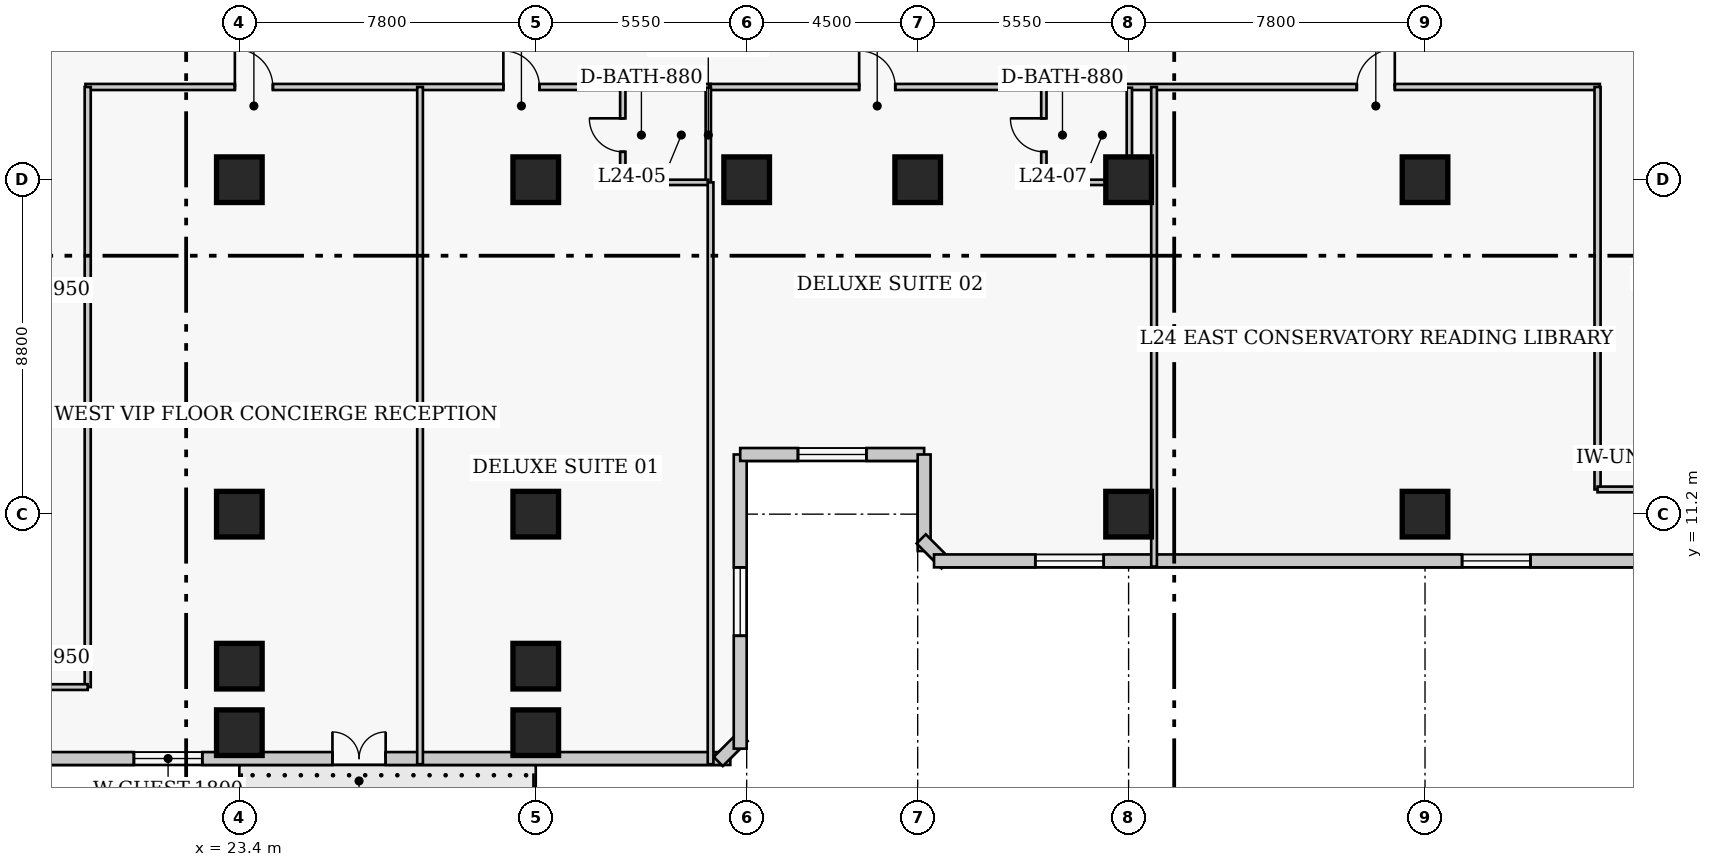
"""IFC4 building model, lengths in metres.
Left out: names, types, materials, properties, quantities, classifications, styles, units other than length and angle.
Written with IfcOpenShell. Run it as: python <this file> out.ifc"""

import sys

from ifc_helpers import new_model, si_unit, direction, frame, frame_2d, origin, origin_2d, place, context, subcontext, project, spatial, rectangle, extrude, element, fill, save


model = new_model("IFC4")
c1 = context("Model", 3, precision=1e-05, world=origin(), true_north=direction((0.0, 1.0)))
c2 = subcontext(c1, "Body", "Model", "MODEL_VIEW")
j1 = project(units=[si_unit("LENGTHUNIT", "METRE"), si_unit("PLANEANGLEUNIT", "RADIAN")], contexts=[c1])
p1 = place(None, origin())
s1 = spatial("IfcSite", under=j1, at=p1, CompositionType="ELEMENT")
p2 = place(p1, origin())
s2 = spatial("IfcBuilding", under=s1, at=p2, CompositionType="ELEMENT")
p3 = place(p2, frame((0.0, 0.0, 99.4)))
s3 = spatial("IfcBuildingStorey", under=s2, at=p3, CompositionType="ELEMENT", Elevation=99.4)
for number, where, z_axis, x_axis in (
    (1, (23.4, 11.2, 0.0), (0.0, 0.0, 1.0), (1.0, 0.0, 0.0)),
    (2, (23.4, 20.0, 0.0), (0.0, 0.0, 1.0), (1.0, 0.0, 0.0)),
    (3, (31.2, 11.2, 0.0), (0.0, 0.0, 1.0), (1.0, 0.0, 0.0)),
    (4, (31.2, 20.0, 0.0), (0.0, 0.0, 1.0), (1.0, 0.0, 0.0)),
    (5, (36.75, 20.0, 0.0), (0.0, 0.0, 1.0), (1.0, 0.0, 0.0)),
    (6, (41.25, 20.0, 0.0), (0.0, 0.0, 1.0), (1.0, 0.0, 0.0)),
    (7, (46.8, 11.2, 0.0), (0.0, 0.0, 1.0), (1.0, 0.0, 0.0)),
    (8, (46.8, 20.0, 0.0), (0.0, 0.0, 1.0), (1.0, 0.0, 0.0)),
    (9, (54.6, 11.2, 0.0), (0.0, 0.0, 1.0), (1.0, 0.0, 0.0)),
    (10, (54.6, 20.0, 0.0), (0.0, 0.0, 1.0), (1.0, 0.0, 0.0)),
    (11, (23.4, 7.2, 0.0), (0.0, 0.0, 1.0), (1.0, 0.0, 0.0)),
    (12, (31.2, 7.2, 0.0), (0.0, 0.0, 1.0), (1.0, 0.0, 0.0)),
    (13, (23.4, 5.45, 0.0), (0.0, 0.0, 1.0), (1.0, 0.0, 0.0)),
    (14, (31.2, 5.45, 0.0), (0.0, 0.0, 1.0), (1.0, 0.0, 0.0)),
):
    element("IfcColumn", number, at=place(p3, frame(where, z_axis=z_axis, x_axis=x_axis)), inside=s3, PredefinedType="COLUMN", context=c2, shape_type="SweptSolid", body=[
        extrude(rectangle(XDim=1.2, YDim=1.2, at=origin_2d()), origin(), (0.0, 0.0, 1.0), 3.8),
    ])
p4 = place(p3, frame((8.03, 4.77, 0.0), z_axis=(0.0, 0.0, 1.0), x_axis=(1.0, 0.0, 0.0)))
e15 = element("IfcWall", 15, at=p4, inside=s3, PredefinedType="SOLIDWALL", context=c2, shape_type="SweptSolid", body=[
    extrude(rectangle(XDim=28.29, YDim=0.34, at=frame_2d((14.145, 0.0))), origin(), (0.0, 0.0, 1.0), 3.54),
])
p5 = place(p4, frame((17.82, 0.0, 0.0)))
e16 = element("IfcOpeningElement", 16, at=p5, cuts=e15, PredefinedType="OPENING", context=c2, shape_type="SweptSolid", body=[
    extrude(rectangle(XDim=1.4, YDim=2.15, at=frame_2d((0.7, 1.075))), frame((0.0, 0.18, 0.0), z_axis=(0.0, -1.0, 0.0), x_axis=(1.0, 0.0, 0.0)), (0.0, 0.0, 1.0), 0.36),
])
p6 = place(p4, frame((12.595, 0.0, 0.85)))
e17 = element("IfcOpeningElement", 17, at=p6, cuts=e15, PredefinedType="OPENING", context=c2, shape_type="SweptSolid", body=[
    extrude(rectangle(XDim=1.8, YDim=1.8, at=frame_2d((0.9, 0.9))), frame((0.0, 0.18, 0.0), z_axis=(0.0, -1.0, 0.0), x_axis=(1.0, 0.0, 0.0)), (0.0, 0.0, 1.0), 0.36),
])
p7 = place(p3, frame((36.001, 4.692, 0.0), z_axis=(0.0, 0.0, 1.0), x_axis=(0.707238225886, 0.706975312048, 0.0)))
e18 = element("IfcWall", 18, at=p7, inside=s3, PredefinedType="SOLIDWALL", context=c2, shape_type="SweptSolid", body=[
    extrude(rectangle(XDim=0.929, YDim=0.34, at=frame_2d((0.464, 0.0))), origin(), (0.0, 0.0, 1.0), 3.54),
])
p8 = place(p3, frame((36.58, 5.03, 0.0), z_axis=(0.0, 0.0, 1.0), x_axis=(0.0, 1.0, 0.0)))
e19 = element("IfcWall", 19, at=p8, inside=s3, PredefinedType="SOLIDWALL", context=c2, shape_type="SweptSolid", body=[
    extrude(rectangle(XDim=7.74, YDim=0.34, at=frame_2d((3.87, 0.0))), origin(), (0.0, 0.0, 1.0), 3.54),
])
p9 = place(p8, frame((2.97, 0.0, 0.85)))
e20 = element("IfcOpeningElement", 20, at=p9, cuts=e19, PredefinedType="OPENING", context=c2, shape_type="SweptSolid", body=[
    extrude(rectangle(XDim=1.8, YDim=1.8, at=frame_2d((0.9, 0.9))), frame((0.0, 0.18, 0.0), z_axis=(0.0, -1.0, 0.0), x_axis=(1.0, 0.0, 0.0)), (0.0, 0.0, 1.0), 0.36),
])
p10 = place(p3, frame((36.58, 12.77, 0.0), z_axis=(0.0, 0.0, 1.0), x_axis=(1.0, 0.0, 0.0)))
e21 = element("IfcWall", 21, at=p10, inside=s3, PredefinedType="SOLIDWALL", context=c2, shape_type="SweptSolid", body=[
    extrude(rectangle(XDim=4.84, YDim=0.34, at=frame_2d((2.42, 0.0))), origin(), (0.0, 0.0, 1.0), 3.54),
])
p11 = place(p10, frame((1.52, 0.0, 0.85)))
e22 = element("IfcOpeningElement", 22, at=p11, cuts=e21, PredefinedType="OPENING", context=c2, shape_type="SweptSolid", body=[
    extrude(rectangle(XDim=1.8, YDim=1.8, at=frame_2d((0.9, 0.9))), frame((0.0, 0.18, 0.0), z_axis=(0.0, -1.0, 0.0), x_axis=(1.0, 0.0, 0.0)), (0.0, 0.0, 1.0), 0.36),
])
p12 = place(p3, frame((41.42, 12.77, 0.0), z_axis=(0.0, 0.0, 1.0), x_axis=(0.0, -1.0, 0.0)))
e23 = element("IfcWall", 23, at=p12, inside=s3, PredefinedType="SOLIDWALL", context=c2, shape_type="SweptSolid", body=[
    extrude(rectangle(XDim=2.54, YDim=0.34, at=frame_2d((1.27, 0.0))), origin(), (0.0, 0.0, 1.0), 3.54),
])
p13 = place(p3, frame((41.342, 10.549, 0.0), z_axis=(0.0, 0.0, 1.0), x_axis=(0.707106781187, -0.707106781187, 0.0)))
e24 = element("IfcWall", 24, at=p13, inside=s3, PredefinedType="SOLIDWALL", context=c2, shape_type="SweptSolid", body=[
    extrude(rectangle(XDim=0.929, YDim=0.34, at=frame_2d((0.464, 0.0))), origin(), (0.0, 0.0, 1.0), 3.54),
])
p14 = place(p3, frame((41.68, 9.97, 0.0), z_axis=(0.0, 0.0, 1.0), x_axis=(1.0, 0.0, 0.0)))
e25 = element("IfcWall", 25, at=p14, inside=s3, PredefinedType="SOLIDWALL", context=c2, shape_type="SweptSolid", body=[
    extrude(rectangle(XDim=28.29, YDim=0.34, at=frame_2d((14.145, 0.0))), origin(), (0.0, 0.0, 1.0), 3.54),
])
p15 = place(p14, frame((2.665, 0.0, 0.85)))
e26 = element("IfcOpeningElement", 26, at=p15, cuts=e25, PredefinedType="OPENING", context=c2, shape_type="SweptSolid", body=[
    extrude(rectangle(XDim=1.8, YDim=1.8, at=frame_2d((0.9, 0.9))), frame((0.0, 0.18, 0.0), z_axis=(0.0, -1.0, 0.0), x_axis=(1.0, 0.0, 0.0)), (0.0, 0.0, 1.0), 0.36),
])
p16 = place(p14, frame((13.895, 0.0, 0.85)))
e27 = element("IfcOpeningElement", 27, at=p16, cuts=e25, PredefinedType="OPENING", context=c2, shape_type="SweptSolid", body=[
    extrude(rectangle(XDim=1.8, YDim=1.8, at=frame_2d((0.9, 0.9))), frame((0.0, 0.18, 0.0), z_axis=(0.0, -1.0, 0.0), x_axis=(1.0, 0.0, 0.0)), (0.0, 0.0, 1.0), 0.36),
])
p17 = place(p3, frame((19.35, 22.44, 0.0), z_axis=(0.0, 0.0, 1.0), x_axis=(1.0, 0.0, 0.0)))
e28 = element("IfcWall", 28, at=p17, inside=s3, PredefinedType="PARTITIONING", context=c2, shape_type="SweptSolid", body=[
    extrude(rectangle(XDim=16.45, YDim=0.16, at=frame_2d((8.225, 0.0))), origin(), (0.0, 0.0, 1.0), 3.54),
])
p18 = place(p17, frame((3.933, 0.0, 0.0)))
e29 = element("IfcOpeningElement", 29, at=p18, cuts=e28, PredefinedType="OPENING", context=c2, shape_type="SweptSolid", body=[
    extrude(rectangle(XDim=1.0, YDim=2.15, at=frame_2d((0.5, 1.075))), frame((0.0, 0.09, 0.0), z_axis=(0.0, -1.0, 0.0), x_axis=(1.0, 0.0, 0.0)), (0.0, 0.0, 1.0), 0.18),
])
p19 = place(p17, frame((10.998, 0.0, 0.0)))
e30 = element("IfcOpeningElement", 30, at=p19, cuts=e28, PredefinedType="OPENING", context=c2, shape_type="SweptSolid", body=[
    extrude(rectangle(XDim=0.95, YDim=2.1, at=frame_2d((0.475, 1.05))), frame((0.0, 0.09, 0.0), z_axis=(0.0, -1.0, 0.0), x_axis=(1.0, 0.0, 0.0)), (0.0, 0.0, 1.0), 0.18),
])
p20 = place(p3, frame((35.8, 22.44, 0.0), z_axis=(0.0, 0.0, 1.0), x_axis=(1.0, 0.0, 0.0)))
e31 = element("IfcWall", 31, at=p20, inside=s3, PredefinedType="PARTITIONING", context=c2, shape_type="SweptSolid", body=[
    extrude(rectangle(XDim=23.4, YDim=0.16, at=frame_2d((11.7, 0.0))), origin(), (0.0, 0.0, 1.0), 3.54),
])
p21 = place(p20, frame((3.91, 0.0, 0.0)))
e32 = element("IfcOpeningElement", 32, at=p21, cuts=e31, PredefinedType="OPENING", context=c2, shape_type="SweptSolid", body=[
    extrude(rectangle(XDim=0.95, YDim=2.1, at=frame_2d((0.475, 1.05))), frame((0.0, 0.09, 0.0), z_axis=(0.0, -1.0, 0.0), x_axis=(1.0, 0.0, 0.0)), (0.0, 0.0, 1.0), 0.18),
])
p22 = place(p20, frame((17.005, 0.0, 0.0)))
e33 = element("IfcOpeningElement", 33, at=p22, cuts=e31, PredefinedType="OPENING", context=c2, shape_type="SweptSolid", body=[
    extrude(rectangle(XDim=1.0, YDim=2.15, at=frame_2d((0.5, 1.075))), frame((0.0, 0.09, 0.0), z_axis=(0.0, -1.0, 0.0), x_axis=(1.0, 0.0, 0.0)), (0.0, 0.0, 1.0), 0.18),
])
p23 = place(p3, frame((19.41, 6.65, 0.0), z_axis=(0.0, 0.0, 1.0), x_axis=(0.0, 1.0, 0.0)))
e34 = element("IfcWall", 34, at=p23, inside=s3, PredefinedType="PARTITIONING", context=c2, shape_type="SweptSolid", body=[
    extrude(rectangle(XDim=15.79, YDim=0.16, at=frame_2d((7.895, 0.0))), origin(), (0.0, 0.0, 1.0), 3.083),
])
p24 = place(p3, frame((59.14, 11.85, 0.0), z_axis=(0.0, 0.0, 1.0), x_axis=(0.0, 1.0, 0.0)))
e35 = element("IfcWall", 35, at=p24, inside=s3, PredefinedType="PARTITIONING", context=c2, shape_type="SweptSolid", body=[
    extrude(rectangle(XDim=10.59, YDim=0.16, at=frame_2d((5.295, 0.0))), origin(), (0.0, 0.0, 1.0), 3.54),
])
p25 = place(p3, frame((59.14, 11.85, 0.0), z_axis=(0.0, 0.0, 1.0), x_axis=(1.0, 0.0, 0.0)))
e36 = element("IfcWall", 36, at=p25, inside=s3, PredefinedType="PARTITIONING", context=c2, shape_type="SweptSolid", body=[
    extrude(rectangle(XDim=2.22, YDim=0.15, at=frame_2d((1.11, 0.0))), origin(), (0.0, 0.0, 1.0), 3.54),
])
p26 = place(p3, frame((17.19, 6.65, 0.0), z_axis=(0.0, 0.0, 1.0), x_axis=(1.0, 0.0, 0.0)))
e37 = element("IfcWall", 37, at=p26, inside=s3, PredefinedType="PARTITIONING", context=c2, shape_type="SweptSolid", body=[
    extrude(rectangle(XDim=2.22, YDim=0.15, at=frame_2d((1.11, 0.0))), origin(), (0.0, 0.0, 1.0), 3.54),
])
p27 = place(p3, frame((28.155, 4.62, 0.0), z_axis=(0.0, 0.0, 1.0), x_axis=(0.0, 1.0, 0.0)))
e38 = element("IfcWall", 38, at=p27, inside=s3, PredefinedType="PARTITIONING", context=c2, shape_type="SweptSolid", body=[
    extrude(rectangle(XDim=17.82, YDim=0.15, at=frame_2d((8.91, 0.0))), origin(), (0.0, 0.0, 1.0), 3.54),
])
p28 = place(p3, frame((33.49, 19.93, 0.0), z_axis=(0.0, 0.0, 1.0), x_axis=(0.0, 1.0, 0.0)))
e39 = element("IfcWall", 39, at=p28, inside=s3, PredefinedType="PLUMBINGWALL", context=c2, shape_type="SweptSolid", body=[
    extrude(rectangle(XDim=2.49, YDim=0.14, at=frame_2d((1.245, 0.0))), origin(), (0.0, 0.0, 1.0), 3.54),
])
p29 = place(p28, frame((0.805, 0.0, 0.0)))
e40 = element("IfcOpeningElement", 40, at=p29, cuts=e39, PredefinedType="OPENING", context=c2, shape_type="SweptSolid", body=[
    extrude(rectangle(XDim=0.88, YDim=2.05, at=frame_2d((0.44, 1.025))), frame((0.0, 0.08, 0.0), z_axis=(0.0, -1.0, 0.0), x_axis=(1.0, 0.0, 0.0)), (0.0, 0.0, 1.0), 0.16),
])
p30 = place(p3, frame((35.74, 19.93, 0.0), z_axis=(0.0, 0.0, 1.0), x_axis=(0.0, 1.0, 0.0)))
e41 = element("IfcWall", 41, at=p30, inside=s3, PredefinedType="PLUMBINGWALL", context=c2, shape_type="SweptSolid", body=[
    extrude(rectangle(XDim=2.49, YDim=0.14, at=frame_2d((1.245, 0.0))), origin(), (0.0, 0.0, 1.0), 3.54),
])
p31 = place(p3, frame((33.49, 19.93, 0.0), z_axis=(0.0, 0.0, 1.0), x_axis=(1.0, 0.0, 0.0)))
e42 = element("IfcWall", 42, at=p31, inside=s3, PredefinedType="PLUMBINGWALL", context=c2, shape_type="SweptSolid", body=[
    extrude(rectangle(XDim=2.25, YDim=0.14, at=frame_2d((1.125, 0.0))), origin(), (0.0, 0.0, 1.0), 2.679),
])
p32 = place(p3, frame((35.8, 4.62, 0.0), z_axis=(0.0, 0.0, 1.0), x_axis=(0.0, 1.0, 0.0)))
e43 = element("IfcWall", 43, at=p32, inside=s3, PredefinedType="PARTITIONING", context=c2, shape_type="SweptSolid", body=[
    extrude(rectangle(XDim=15.31, YDim=0.15, at=frame_2d((7.655, 0.0))), origin(), (0.0, 0.0, 1.0), 3.54),
])
p33 = place(p3, frame((44.57, 19.93, 0.0), z_axis=(0.0, 0.0, 1.0), x_axis=(0.0, 1.0, 0.0)))
e44 = element("IfcWall", 44, at=p33, inside=s3, PredefinedType="PLUMBINGWALL", context=c2, shape_type="SweptSolid", body=[
    extrude(rectangle(XDim=2.49, YDim=0.14, at=frame_2d((1.245, 0.0))), origin(), (0.0, 0.0, 1.0), 3.54),
])
p34 = place(p33, frame((0.805, 0.0, 0.0)))
e45 = element("IfcOpeningElement", 45, at=p34, cuts=e44, PredefinedType="OPENING", context=c2, shape_type="SweptSolid", body=[
    extrude(rectangle(XDim=0.88, YDim=2.05, at=frame_2d((0.44, 1.025))), frame((0.0, 0.08, 0.0), z_axis=(0.0, -1.0, 0.0), x_axis=(1.0, 0.0, 0.0)), (0.0, 0.0, 1.0), 0.16),
])
p35 = place(p3, frame((46.82, 19.93, 0.0), z_axis=(0.0, 0.0, 1.0), x_axis=(0.0, 1.0, 0.0)))
e46 = element("IfcWall", 46, at=p35, inside=s3, PredefinedType="PLUMBINGWALL", context=c2, shape_type="SweptSolid", body=[
    extrude(rectangle(XDim=2.49, YDim=0.14, at=frame_2d((1.245, 0.0))), origin(), (0.0, 0.0, 1.0), 2.679),
])
p36 = place(p3, frame((44.57, 19.93, 0.0), z_axis=(0.0, 0.0, 1.0), x_axis=(1.0, 0.0, 0.0)))
e47 = element("IfcWall", 47, at=p36, inside=s3, PredefinedType="PLUMBINGWALL", context=c2, shape_type="SweptSolid", body=[
    extrude(rectangle(XDim=2.25, YDim=0.14, at=frame_2d((1.125, 0.0))), origin(), (0.0, 0.0, 1.0), 2.679),
])
p37 = place(p3, frame((47.47, 9.82, 0.0), z_axis=(0.0, 0.0, 1.0), x_axis=(0.0, 1.0, 0.0)))
e48 = element("IfcWall", 48, at=p37, inside=s3, PredefinedType="PARTITIONING", context=c2, shape_type="SweptSolid", body=[
    extrude(rectangle(XDim=12.62, YDim=0.15, at=frame_2d((6.31, 0.0))), origin(), (0.0, 0.0, 1.0), 3.54),
])
p38 = place(p5, origin())
e49 = element("IfcDoor", 49, at=p38, inside=s3, OperationType="DOUBLE_DOOR_SINGLE_SWING", PredefinedType="DOOR", context=c2, shape_type="SweptSolid", body=[
    extrude(rectangle(XDim=1.4, YDim=2.15, at=frame_2d((0.7, 1.075))), frame((0.0, 0.025, 0.0), z_axis=(0.0, -1.0, 0.0), x_axis=(1.0, 0.0, 0.0)), (0.0, 0.0, 1.0), 0.05),
])
fill(e16, e49)
p39 = place(p6, origin())
e50 = element("IfcWindow", 50, at=p39, inside=s3, PartitioningType="SINGLE_PANEL", PredefinedType="WINDOW", context=c2, shape_type="SweptSolid", body=[
    extrude(rectangle(XDim=1.8, YDim=1.8, at=frame_2d((0.9, 0.9))), frame((0.0, 0.03, 0.0), z_axis=(0.0, -1.0, 0.0), x_axis=(1.0, 0.0, 0.0)), (0.0, 0.0, 1.0), 0.06),
])
fill(e17, e50)
p40 = place(p9, origin())
e51 = element("IfcWindow", 51, at=p40, inside=s3, PartitioningType="SINGLE_PANEL", PredefinedType="WINDOW", context=c2, shape_type="SweptSolid", body=[
    extrude(rectangle(XDim=1.8, YDim=1.8, at=frame_2d((0.9, 0.9))), frame((0.0, 0.03, 0.0), z_axis=(0.0, -1.0, 0.0), x_axis=(1.0, 0.0, 0.0)), (0.0, 0.0, 1.0), 0.06),
])
fill(e20, e51)
p41 = place(p11, origin())
e52 = element("IfcWindow", 52, at=p41, inside=s3, PartitioningType="SINGLE_PANEL", PredefinedType="WINDOW", context=c2, shape_type="SweptSolid", body=[
    extrude(rectangle(XDim=1.8, YDim=1.8, at=frame_2d((0.9, 0.9))), frame((0.0, 0.03, 0.0), z_axis=(0.0, -1.0, 0.0), x_axis=(1.0, 0.0, 0.0)), (0.0, 0.0, 1.0), 0.06),
])
fill(e22, e52)
p42 = place(p15, origin())
e53 = element("IfcWindow", 53, at=p42, inside=s3, PartitioningType="SINGLE_PANEL", PredefinedType="WINDOW", context=c2, shape_type="SweptSolid", body=[
    extrude(rectangle(XDim=1.8, YDim=1.8, at=frame_2d((0.9, 0.9))), frame((0.0, 0.03, 0.0), z_axis=(0.0, -1.0, 0.0), x_axis=(1.0, 0.0, 0.0)), (0.0, 0.0, 1.0), 0.06),
])
fill(e26, e53)
p43 = place(p16, origin())
e54 = element("IfcWindow", 54, at=p43, inside=s3, PartitioningType="SINGLE_PANEL", PredefinedType="WINDOW", context=c2, shape_type="SweptSolid", body=[
    extrude(rectangle(XDim=1.8, YDim=1.8, at=frame_2d((0.9, 0.9))), frame((0.0, 0.03, 0.0), z_axis=(0.0, -1.0, 0.0), x_axis=(1.0, 0.0, 0.0)), (0.0, 0.0, 1.0), 0.06),
])
fill(e27, e54)
p44 = place(p18, origin())
e55 = element("IfcDoor", 55, at=p44, inside=s3, OperationType="SINGLE_SWING_LEFT", PredefinedType="DOOR", context=c2, shape_type="SweptSolid", body=[
    extrude(rectangle(XDim=1.0, YDim=2.15, at=frame_2d((0.5, 1.075))), frame((0.0, 0.025, 0.0), z_axis=(0.0, -1.0, 0.0), x_axis=(1.0, 0.0, 0.0)), (0.0, 0.0, 1.0), 0.05),
])
fill(e29, e55)
p45 = place(p29, origin())
e56 = element("IfcDoor", 56, at=p45, inside=s3, OperationType="SINGLE_SWING_RIGHT", PredefinedType="DOOR", context=c2, shape_type="SweptSolid", body=[
    extrude(rectangle(XDim=0.88, YDim=2.05, at=frame_2d((0.44, 1.025))), frame((0.0, 0.025, 0.0), z_axis=(0.0, -1.0, 0.0), x_axis=(1.0, 0.0, 0.0)), (0.0, 0.0, 1.0), 0.05),
])
fill(e40, e56)
p46 = place(p19, origin())
e57 = element("IfcDoor", 57, at=p46, inside=s3, OperationType="SINGLE_SWING_LEFT", PredefinedType="DOOR", context=c2, shape_type="SweptSolid", body=[
    extrude(rectangle(XDim=0.95, YDim=2.1, at=frame_2d((0.475, 1.05))), frame((0.0, 0.025, 0.0), z_axis=(0.0, -1.0, 0.0), x_axis=(1.0, 0.0, 0.0)), (0.0, 0.0, 1.0), 0.05),
])
fill(e30, e57)
p47 = place(p34, origin())
e58 = element("IfcDoor", 58, at=p47, inside=s3, OperationType="SINGLE_SWING_RIGHT", PredefinedType="DOOR", context=c2, shape_type="SweptSolid", body=[
    extrude(rectangle(XDim=0.88, YDim=2.05, at=frame_2d((0.44, 1.025))), frame((0.0, 0.025, 0.0), z_axis=(0.0, -1.0, 0.0), x_axis=(1.0, 0.0, 0.0)), (0.0, 0.0, 1.0), 0.05),
])
fill(e45, e58)
p48 = place(p21, origin())
e59 = element("IfcDoor", 59, at=p48, inside=s3, OperationType="SINGLE_SWING_LEFT", PredefinedType="DOOR", context=c2, shape_type="SweptSolid", body=[
    extrude(rectangle(XDim=0.95, YDim=2.1, at=frame_2d((0.475, 1.05))), frame((0.0, 0.025, 0.0), z_axis=(0.0, -1.0, 0.0), x_axis=(1.0, 0.0, 0.0)), (0.0, 0.0, 1.0), 0.05),
])
fill(e32, e59)
p49 = place(p22, origin())
e60 = element("IfcDoor", 60, at=p49, inside=s3, OperationType="SINGLE_SWING_RIGHT", PredefinedType="DOOR", context=c2, shape_type="SweptSolid", body=[
    extrude(rectangle(XDim=1.0, YDim=2.15, at=frame_2d((0.5, 1.075))), frame((0.0, 0.025, 0.0), z_axis=(0.0, -1.0, 0.0), x_axis=(1.0, 0.0, 0.0)), (0.0, 0.0, 1.0), 0.05),
])
fill(e33, e60)
save(model, sys.argv[1])
